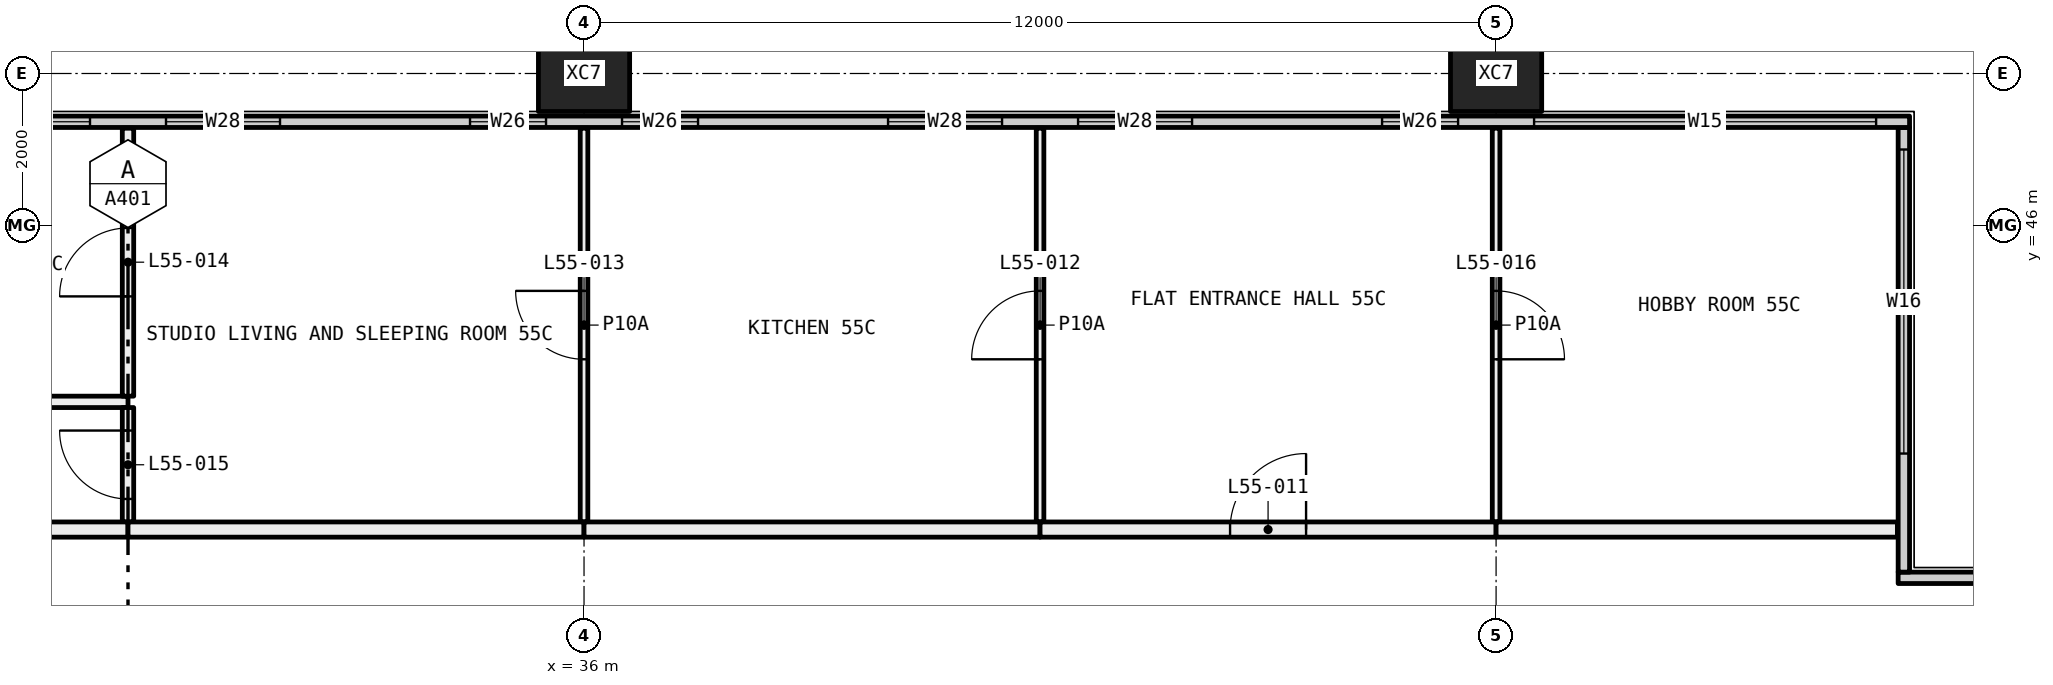
"""IFC4 building model, lengths in metres.
Left out: names, types, materials, properties, quantities, classifications, styles, units other than length and angle.
Written with IfcOpenShell. Run it as: python <this file> out.ifc"""

import sys

from ifc_helpers import new_model, si_unit, direction, frame, frame_2d, origin, origin_2d, place, context, subcontext, project, spatial, rectangle, hollow_rectangle, extrude, element, fill, save


model = new_model("IFC4")
c1 = context("Model", 3, precision=1e-05, world=origin(), true_north=direction((0.0, 1.0)))
c2 = subcontext(c1, "Body", "Model", "MODEL_VIEW")
j1 = project(units=[si_unit("LENGTHUNIT", "METRE"), si_unit("PLANEANGLEUNIT", "RADIAN")], contexts=[c1])
p1 = place(None, origin())
s1 = spatial("IfcSite", under=j1, at=p1, CompositionType="ELEMENT")
p2 = place(p1, origin())
s2 = spatial("IfcBuilding", under=s1, at=p2, CompositionType="ELEMENT")
p3 = place(p2, frame((0.0, 0.0, 206.55)))
s3 = spatial("IfcBuildingStorey", under=s2, at=p3, CompositionType="ELEMENT", Elevation=206.55)
for number, where, z_axis, x_axis in (
    (1, (36.0, 48.0, -0.4), (0.0, 0.0, 1.0), (1.0, 0.0, 0.0)),
    (2, (48.0, 48.0, -0.4), (0.0, 0.0, 1.0), (1.0, 0.0, 0.0)),
):
    element("IfcColumn", number, at=place(p3, frame(where, z_axis=z_axis, x_axis=x_axis)), inside=s3, PredefinedType="COLUMN", context=c2, shape_type="SweptSolid", body=[
        extrude(hollow_rectangle(XDim=1.2, YDim=1.0, WallThickness=0.045, at=origin_2d()), origin(), (0.0, 0.0, 1.0), 3.45),
    ])
p4 = place(p3, frame((53.29, 41.365, 0.0), z_axis=(0.0, 0.0, 1.0), x_axis=(1.0, 0.0, 0.0)))
e3 = element("IfcWall", 3, at=p4, inside=s3, PredefinedType="ELEMENTEDWALL", context=c2, shape_type="SweptSolid", body=[
    extrude(rectangle(XDim=6.15, YDim=0.15, at=frame_2d((3.075, 0.0))), origin(), (0.0, 0.0, 1.0), 3.05),
])
p5 = place(p4, frame((1.71, 0.0, 0.45)))
e4 = element("IfcOpeningElement", 4, at=p5, cuts=e3, PredefinedType="OPENING", context=c2, shape_type="SweptSolid", body=[
    extrude(rectangle(XDim=4.0, YDim=2.55, at=frame_2d((2.0, 1.275))), frame((0.0, 0.085, 0.0), z_axis=(0.0, -1.0, 0.0), x_axis=(1.0, 0.0, 0.0)), (0.0, 0.0, 1.0), 0.17),
])
p6 = place(p3, frame((53.365, 41.44, 0.0), z_axis=(0.0, 0.0, 1.0), x_axis=(0.0, 1.0, 0.0)))
e5 = element("IfcWall", 5, at=p6, inside=s3, PredefinedType="ELEMENTEDWALL", context=c2, shape_type="SweptSolid", body=[
    extrude(rectangle(XDim=5.85, YDim=0.15, at=frame_2d((2.925, 0.0))), origin(), (0.0, 0.0, 1.0), 3.05),
])
p7 = place(p6, frame((1.56, 0.0, 0.45)))
e6 = element("IfcOpeningElement", 6, at=p7, cuts=e5, PredefinedType="OPENING", context=c2, shape_type="SweptSolid", body=[
    extrude(rectangle(XDim=4.0, YDim=2.55, at=frame_2d((2.0, 1.275))), frame((0.0, 0.085, 0.0), z_axis=(0.0, -1.0, 0.0), x_axis=(1.0, 0.0, 0.0)), (0.0, 0.0, 1.0), 0.17),
])
p8 = place(p3, frame((6.56, 47.365, 0.0), z_axis=(0.0, 0.0, 1.0), x_axis=(1.0, 0.0, 0.0)))
e7 = element("IfcWall", 7, at=p8, inside=s3, PredefinedType="ELEMENTEDWALL", context=c2, shape_type="SweptSolid", body=[
    extrude(rectangle(XDim=46.88, YDim=0.15, at=frame_2d((23.44, 0.0))), origin(), (0.0, 0.0, 1.0), 3.05),
])
p9 = place(p8, frame((0.44, 0.0, 0.45)))
e8 = element("IfcOpeningElement", 8, at=p9, cuts=e7, PredefinedType="OPENING", context=c2, shape_type="SweptSolid", body=[
    extrude(rectangle(XDim=4.5, YDim=2.55, at=frame_2d((2.25, 1.275))), frame((0.0, 0.085, 0.0), z_axis=(0.0, -1.0, 0.0), x_axis=(1.0, 0.0, 0.0)), (0.0, 0.0, 1.0), 0.17),
])
p10 = place(p8, frame((5.94, 0.0, 0.45)))
e9 = element("IfcOpeningElement", 9, at=p10, cuts=e7, PredefinedType="OPENING", context=c2, shape_type="SweptSolid", body=[
    extrude(rectangle(XDim=1.0, YDim=2.55, at=frame_2d((0.5, 1.275))), frame((0.0, 0.085, 0.0), z_axis=(0.0, -1.0, 0.0), x_axis=(1.0, 0.0, 0.0)), (0.0, 0.0, 1.0), 0.17),
])
p11 = place(p8, frame((9.44, 0.0, 0.45)))
e10 = element("IfcOpeningElement", 10, at=p11, cuts=e7, PredefinedType="OPENING", context=c2, shape_type="SweptSolid", body=[
    extrude(rectangle(XDim=1.5, YDim=2.55, at=frame_2d((0.75, 1.275))), frame((0.0, 0.085, 0.0), z_axis=(0.0, -1.0, 0.0), x_axis=(1.0, 0.0, 0.0)), (0.0, 0.0, 1.0), 0.17),
])
p12 = place(p8, frame((11.94, 0.0, 0.45)))
e11 = element("IfcOpeningElement", 11, at=p12, cuts=e7, PredefinedType="OPENING", context=c2, shape_type="SweptSolid", body=[
    extrude(rectangle(XDim=1.5, YDim=2.55, at=frame_2d((0.75, 1.275))), frame((0.0, 0.085, 0.0), z_axis=(0.0, -1.0, 0.0), x_axis=(1.0, 0.0, 0.0)), (0.0, 0.0, 1.0), 0.17),
])
p13 = place(p8, frame((15.94, 0.0, 0.45)))
e12 = element("IfcOpeningElement", 12, at=p13, cuts=e7, PredefinedType="OPENING", context=c2, shape_type="SweptSolid", body=[
    extrude(rectangle(XDim=1.0, YDim=2.55, at=frame_2d((0.5, 1.275))), frame((0.0, 0.085, 0.0), z_axis=(0.0, -1.0, 0.0), x_axis=(1.0, 0.0, 0.0)), (0.0, 0.0, 1.0), 0.17),
])
p14 = place(p8, frame((17.94, 0.0, 0.45)))
e13 = element("IfcOpeningElement", 13, at=p14, cuts=e7, PredefinedType="OPENING", context=c2, shape_type="SweptSolid", body=[
    extrude(rectangle(XDim=1.0, YDim=2.55, at=frame_2d((0.5, 1.275))), frame((0.0, 0.085, 0.0), z_axis=(0.0, -1.0, 0.0), x_axis=(1.0, 0.0, 0.0)), (0.0, 0.0, 1.0), 0.17),
])
p15 = place(p8, frame((21.44, 0.0, 0.45)))
e14 = element("IfcOpeningElement", 14, at=p15, cuts=e7, PredefinedType="OPENING", context=c2, shape_type="SweptSolid", body=[
    extrude(rectangle(XDim=1.5, YDim=2.55, at=frame_2d((0.75, 1.275))), frame((0.0, 0.085, 0.0), z_axis=(0.0, -1.0, 0.0), x_axis=(1.0, 0.0, 0.0)), (0.0, 0.0, 1.0), 0.17),
])
p16 = place(p8, frame((23.94, 0.0, 0.45)))
e15 = element("IfcOpeningElement", 15, at=p16, cuts=e7, PredefinedType="OPENING", context=c2, shape_type="SweptSolid", body=[
    extrude(rectangle(XDim=1.5, YDim=2.55, at=frame_2d((0.75, 1.275))), frame((0.0, 0.085, 0.0), z_axis=(0.0, -1.0, 0.0), x_axis=(1.0, 0.0, 0.0)), (0.0, 0.0, 1.0), 0.17),
])
p17 = place(p8, frame((27.94, 0.0, 0.45)))
e16 = element("IfcOpeningElement", 16, at=p17, cuts=e7, PredefinedType="OPENING", context=c2, shape_type="SweptSolid", body=[
    extrude(rectangle(XDim=1.0, YDim=2.55, at=frame_2d((0.5, 1.275))), frame((0.0, 0.085, 0.0), z_axis=(0.0, -1.0, 0.0), x_axis=(1.0, 0.0, 0.0)), (0.0, 0.0, 1.0), 0.17),
])
p18 = place(p8, frame((29.94, 0.0, 0.45)))
e17 = element("IfcOpeningElement", 17, at=p18, cuts=e7, PredefinedType="OPENING", context=c2, shape_type="SweptSolid", body=[
    extrude(rectangle(XDim=1.0, YDim=2.55, at=frame_2d((0.5, 1.275))), frame((0.0, 0.085, 0.0), z_axis=(0.0, -1.0, 0.0), x_axis=(1.0, 0.0, 0.0)), (0.0, 0.0, 1.0), 0.17),
])
p19 = place(p8, frame((33.44, 0.0, 0.45)))
e18 = element("IfcOpeningElement", 18, at=p19, cuts=e7, PredefinedType="OPENING", context=c2, shape_type="SweptSolid", body=[
    extrude(rectangle(XDim=1.5, YDim=2.55, at=frame_2d((0.75, 1.275))), frame((0.0, 0.085, 0.0), z_axis=(0.0, -1.0, 0.0), x_axis=(1.0, 0.0, 0.0)), (0.0, 0.0, 1.0), 0.17),
])
p20 = place(p8, frame((35.94, 0.0, 0.45)))
e19 = element("IfcOpeningElement", 19, at=p20, cuts=e7, PredefinedType="OPENING", context=c2, shape_type="SweptSolid", body=[
    extrude(rectangle(XDim=1.5, YDim=2.55, at=frame_2d((0.75, 1.275))), frame((0.0, 0.085, 0.0), z_axis=(0.0, -1.0, 0.0), x_axis=(1.0, 0.0, 0.0)), (0.0, 0.0, 1.0), 0.17),
])
p21 = place(p8, frame((39.94, 0.0, 0.45)))
e20 = element("IfcOpeningElement", 20, at=p21, cuts=e7, PredefinedType="OPENING", context=c2, shape_type="SweptSolid", body=[
    extrude(rectangle(XDim=1.0, YDim=2.55, at=frame_2d((0.5, 1.275))), frame((0.0, 0.085, 0.0), z_axis=(0.0, -1.0, 0.0), x_axis=(1.0, 0.0, 0.0)), (0.0, 0.0, 1.0), 0.17),
])
p22 = place(p8, frame((41.94, 0.0, 0.45)))
e21 = element("IfcOpeningElement", 21, at=p22, cuts=e7, PredefinedType="OPENING", context=c2, shape_type="SweptSolid", body=[
    extrude(rectangle(XDim=4.5, YDim=2.55, at=frame_2d((2.25, 1.275))), frame((0.0, 0.085, 0.0), z_axis=(0.0, -1.0, 0.0), x_axis=(1.0, 0.0, 0.0)), (0.0, 0.0, 1.0), 0.17),
])
p23 = place(p3, frame((24.1, 43.68, 0.0), z_axis=(0.0, 0.0, 1.0), x_axis=(1.0, 0.0, 0.0)))
e22 = element("IfcWall", 22, at=p23, inside=s3, PredefinedType="PARTITIONING", context=c2, shape_type="SweptSolid", body=[
    extrude(rectangle(XDim=5.9, YDim=0.15, at=frame_2d((2.95, 0.0))), origin(), (0.0, 0.0, 1.0), 3.05),
])
p24 = place(p3, frame((30.0, 43.755, 0.0), z_axis=(0.0, 0.0, 1.0), x_axis=(0.0, 1.0, 0.0)))
e23 = element("IfcWall", 23, at=p24, inside=s3, PredefinedType="PARTITIONING", context=c2, shape_type="SweptSolid", body=[
    extrude(rectangle(XDim=3.525, YDim=0.15, at=frame_2d((1.763, 0.0))), origin(), (0.0, 0.0, 1.0), 3.05),
])
p25 = place(p24, frame((1.312, 0.0, 0.0)))
e24 = element("IfcOpeningElement", 24, at=p25, cuts=e23, PredefinedType="OPENING", context=c2, shape_type="SweptSolid", body=[
    extrude(rectangle(XDim=0.9, YDim=2.1, at=frame_2d((0.45, 1.05))), frame((0.0, 0.085, 0.0), z_axis=(0.0, -1.0, 0.0), x_axis=(1.0, 0.0, 0.0)), (0.0, 0.0, 1.0), 0.17),
])
p26 = place(p3, frame((30.0, 42.1, 0.0), z_axis=(0.0, 0.0, 1.0), x_axis=(0.0, 1.0, 0.0)))
e25 = element("IfcWall", 25, at=p26, inside=s3, PredefinedType="PARTITIONING", context=c2, shape_type="SweptSolid", body=[
    extrude(rectangle(XDim=1.505, YDim=0.15, at=frame_2d((0.752, 0.0))), origin(), (0.0, 0.0, 1.0), 3.05),
])
p27 = place(p26, frame((0.302, 0.0, 0.0)))
e26 = element("IfcOpeningElement", 26, at=p27, cuts=e25, PredefinedType="OPENING", context=c2, shape_type="SweptSolid", body=[
    extrude(rectangle(XDim=0.9, YDim=2.1, at=frame_2d((0.45, 1.05))), frame((0.0, 0.085, 0.0), z_axis=(0.0, -1.0, 0.0), x_axis=(1.0, 0.0, 0.0)), (0.0, 0.0, 1.0), 0.17),
])
p28 = place(p3, frame((24.1, 42.0, 0.0), z_axis=(0.0, 0.0, 1.0), x_axis=(1.0, 0.0, 0.0)))
e27 = element("IfcWall", 27, at=p28, inside=s3, PredefinedType="PARTITIONING", context=c2, shape_type="SweptSolid", body=[
    extrude(rectangle(XDim=5.9, YDim=0.2, at=frame_2d((2.95, 0.0))), origin(), (0.0, 0.0, 1.0), 3.05),
])
p29 = place(p3, frame((36.0, 42.1, 0.0), z_axis=(0.0, 0.0, 1.0), x_axis=(0.0, 1.0, 0.0)))
e28 = element("IfcWall", 28, at=p29, inside=s3, PredefinedType="PARTITIONING", context=c2, shape_type="SweptSolid", body=[
    extrude(rectangle(XDim=5.18, YDim=0.1, at=frame_2d((2.59, 0.0))), origin(), (0.0, 0.0, 1.0), 2.45),
])
p30 = place(p29, frame((2.14, 0.0, 0.0)))
e29 = element("IfcOpeningElement", 29, at=p30, cuts=e28, PredefinedType="OPENING", context=c2, shape_type="SweptSolid", body=[
    extrude(rectangle(XDim=0.9, YDim=2.1, at=frame_2d((0.45, 1.05))), frame((0.0, 0.06, 0.0), z_axis=(0.0, -1.0, 0.0), x_axis=(1.0, 0.0, 0.0)), (0.0, 0.0, 1.0), 0.12),
])
p31 = place(p3, frame((30.0, 42.0, 0.0), z_axis=(0.0, 0.0, 1.0), x_axis=(1.0, 0.0, 0.0)))
e30 = element("IfcWall", 30, at=p31, inside=s3, PredefinedType="PARTITIONING", context=c2, shape_type="SweptSolid", body=[
    extrude(rectangle(XDim=6.0, YDim=0.2, at=frame_2d((3.0, 0.0))), origin(), (0.0, 0.0, 1.0), 2.45),
])
p32 = place(p3, frame((42.0, 42.1, 0.0), z_axis=(0.0, 0.0, 1.0), x_axis=(0.0, 1.0, 0.0)))
e31 = element("IfcWall", 31, at=p32, inside=s3, PredefinedType="PARTITIONING", context=c2, shape_type="SweptSolid", body=[
    extrude(rectangle(XDim=5.18, YDim=0.1, at=frame_2d((2.59, 0.0))), origin(), (0.0, 0.0, 1.0), 3.05),
])
p33 = place(p32, frame((2.14, 0.0, 0.0)))
e32 = element("IfcOpeningElement", 32, at=p33, cuts=e31, PredefinedType="OPENING", context=c2, shape_type="SweptSolid", body=[
    extrude(rectangle(XDim=0.9, YDim=2.1, at=frame_2d((0.45, 1.05))), frame((0.0, 0.06, 0.0), z_axis=(0.0, -1.0, 0.0), x_axis=(1.0, 0.0, 0.0)), (0.0, 0.0, 1.0), 0.12),
])
p34 = place(p3, frame((36.0, 42.0, 0.0), z_axis=(0.0, 0.0, 1.0), x_axis=(1.0, 0.0, 0.0)))
e33 = element("IfcWall", 33, at=p34, inside=s3, PredefinedType="PARTITIONING", context=c2, shape_type="SweptSolid", body=[
    extrude(rectangle(XDim=6.0, YDim=0.2, at=frame_2d((3.0, 0.0))), origin(), (0.0, 0.0, 1.0), 2.45),
])
p35 = place(p3, frame((48.0, 42.1, 0.0), z_axis=(0.0, 0.0, 1.0), x_axis=(0.0, 1.0, 0.0)))
e34 = element("IfcWall", 34, at=p35, inside=s3, PredefinedType="PARTITIONING", context=c2, shape_type="SweptSolid", body=[
    extrude(rectangle(XDim=5.18, YDim=0.1, at=frame_2d((2.59, 0.0))), origin(), (0.0, 0.0, 1.0), 3.05),
])
p36 = place(p35, frame((2.14, 0.0, 0.0)))
e35 = element("IfcOpeningElement", 35, at=p36, cuts=e34, PredefinedType="OPENING", context=c2, shape_type="SweptSolid", body=[
    extrude(rectangle(XDim=0.9, YDim=2.1, at=frame_2d((0.45, 1.05))), frame((0.0, 0.06, 0.0), z_axis=(0.0, -1.0, 0.0), x_axis=(1.0, 0.0, 0.0)), (0.0, 0.0, 1.0), 0.12),
])
p37 = place(p3, frame((42.0, 42.0, 0.0), z_axis=(0.0, 0.0, 1.0), x_axis=(1.0, 0.0, 0.0)))
e36 = element("IfcWall", 36, at=p37, inside=s3, PredefinedType="PARTITIONING", context=c2, shape_type="SweptSolid", body=[
    extrude(rectangle(XDim=6.0, YDim=0.2, at=frame_2d((3.0, 0.0))), origin(), (0.0, 0.0, 1.0), 3.05),
])
p38 = place(p37, frame((2.5, 0.0, 0.0)))
e37 = element("IfcOpeningElement", 37, at=p38, cuts=e36, PredefinedType="OPENING", context=c2, shape_type="SweptSolid", body=[
    extrude(rectangle(XDim=1.0, YDim=2.1, at=frame_2d((0.5, 1.05))), frame((0.0, 0.11, 0.0), z_axis=(0.0, -1.0, 0.0), x_axis=(1.0, 0.0, 0.0)), (0.0, 0.0, 1.0), 0.22),
])
p39 = place(p3, frame((48.0, 42.0, 0.0), z_axis=(0.0, 0.0, 1.0), x_axis=(1.0, 0.0, 0.0)))
e38 = element("IfcWall", 38, at=p39, inside=s3, PredefinedType="PARTITIONING", context=c2, shape_type="SweptSolid", body=[
    extrude(rectangle(XDim=5.28, YDim=0.2, at=frame_2d((2.64, 0.0))), origin(), (0.0, 0.0, 1.0), 3.05),
])
p40 = place(p7, origin())
e39 = element("IfcWindow", 39, at=p40, inside=s3, PartitioningType="SINGLE_PANEL", PredefinedType="WINDOW", context=c2, shape_type="SweptSolid", body=[
    extrude(rectangle(XDim=4.0, YDim=2.55, at=frame_2d((2.0, 1.275))), frame((0.0, 0.03, 0.0), z_axis=(0.0, -1.0, 0.0), x_axis=(1.0, 0.0, 0.0)), (0.0, 0.0, 1.0), 0.06),
])
fill(e6, e39)
p41 = place(p15, origin())
e40 = element("IfcWindow", 40, at=p41, inside=s3, PartitioningType="SINGLE_PANEL", PredefinedType="WINDOW", context=c2, shape_type="SweptSolid", body=[
    extrude(rectangle(XDim=1.5, YDim=2.55, at=frame_2d((0.75, 1.275))), frame((0.0, 0.03, 0.0), z_axis=(0.0, -1.0, 0.0), x_axis=(1.0, 0.0, 0.0)), (0.0, 0.0, 1.0), 0.06),
])
fill(e14, e40)
p42 = place(p16, origin())
e41 = element("IfcWindow", 41, at=p42, inside=s3, PartitioningType="SINGLE_PANEL", PredefinedType="WINDOW", context=c2, shape_type="SweptSolid", body=[
    extrude(rectangle(XDim=1.5, YDim=2.55, at=frame_2d((0.75, 1.275))), frame((0.0, 0.03, 0.0), z_axis=(0.0, -1.0, 0.0), x_axis=(1.0, 0.0, 0.0)), (0.0, 0.0, 1.0), 0.06),
])
fill(e15, e41)
p43 = place(p17, origin())
e42 = element("IfcWindow", 42, at=p43, inside=s3, PartitioningType="SINGLE_PANEL", PredefinedType="WINDOW", context=c2, shape_type="SweptSolid", body=[
    extrude(rectangle(XDim=1.0, YDim=2.55, at=frame_2d((0.5, 1.275))), frame((0.0, 0.03, 0.0), z_axis=(0.0, -1.0, 0.0), x_axis=(1.0, 0.0, 0.0)), (0.0, 0.0, 1.0), 0.06),
])
fill(e16, e42)
p44 = place(p18, origin())
e43 = element("IfcWindow", 43, at=p44, inside=s3, PartitioningType="SINGLE_PANEL", PredefinedType="WINDOW", context=c2, shape_type="SweptSolid", body=[
    extrude(rectangle(XDim=1.0, YDim=2.55, at=frame_2d((0.5, 1.275))), frame((0.0, 0.03, 0.0), z_axis=(0.0, -1.0, 0.0), x_axis=(1.0, 0.0, 0.0)), (0.0, 0.0, 1.0), 0.06),
])
fill(e17, e43)
p45 = place(p19, origin())
e44 = element("IfcWindow", 44, at=p45, inside=s3, PartitioningType="SINGLE_PANEL", PredefinedType="WINDOW", context=c2, shape_type="SweptSolid", body=[
    extrude(rectangle(XDim=1.5, YDim=2.55, at=frame_2d((0.75, 1.275))), frame((0.0, 0.03, 0.0), z_axis=(0.0, -1.0, 0.0), x_axis=(1.0, 0.0, 0.0)), (0.0, 0.0, 1.0), 0.06),
])
fill(e18, e44)
p46 = place(p20, origin())
e45 = element("IfcWindow", 45, at=p46, inside=s3, PartitioningType="SINGLE_PANEL", PredefinedType="WINDOW", context=c2, shape_type="SweptSolid", body=[
    extrude(rectangle(XDim=1.5, YDim=2.55, at=frame_2d((0.75, 1.275))), frame((0.0, 0.03, 0.0), z_axis=(0.0, -1.0, 0.0), x_axis=(1.0, 0.0, 0.0)), (0.0, 0.0, 1.0), 0.06),
])
fill(e19, e45)
p47 = place(p21, origin())
e46 = element("IfcWindow", 46, at=p47, inside=s3, PartitioningType="SINGLE_PANEL", PredefinedType="WINDOW", context=c2, shape_type="SweptSolid", body=[
    extrude(rectangle(XDim=1.0, YDim=2.55, at=frame_2d((0.5, 1.275))), frame((0.0, 0.03, 0.0), z_axis=(0.0, -1.0, 0.0), x_axis=(1.0, 0.0, 0.0)), (0.0, 0.0, 1.0), 0.06),
])
fill(e20, e46)
p48 = place(p22, origin())
e47 = element("IfcWindow", 47, at=p48, inside=s3, PartitioningType="SINGLE_PANEL", PredefinedType="WINDOW", context=c2, shape_type="SweptSolid", body=[
    extrude(rectangle(XDim=4.5, YDim=2.55, at=frame_2d((2.25, 1.275))), frame((0.0, 0.03, 0.0), z_axis=(0.0, -1.0, 0.0), x_axis=(1.0, 0.0, 0.0)), (0.0, 0.0, 1.0), 0.06),
])
fill(e21, e47)
p49 = place(p38, origin())
e48 = element("IfcDoor", 48, at=p49, inside=s3, OperationType="SINGLE_SWING_LEFT", PredefinedType="DOOR", context=c2, shape_type="SweptSolid", body=[
    extrude(rectangle(XDim=1.0, YDim=2.1, at=frame_2d((0.5, 1.05))), frame((0.0, 0.025, 0.0), z_axis=(0.0, -1.0, 0.0), x_axis=(1.0, 0.0, 0.0)), (0.0, 0.0, 1.0), 0.05),
])
fill(e37, e48)
p50 = place(p33, origin())
e49 = element("IfcDoor", 49, at=p50, inside=s3, OperationType="SINGLE_SWING_RIGHT", PredefinedType="DOOR", context=c2, shape_type="SweptSolid", body=[
    extrude(rectangle(XDim=0.9, YDim=2.1, at=frame_2d((0.45, 1.05))), frame((0.0, 0.025, 0.0), z_axis=(0.0, -1.0, 0.0), x_axis=(1.0, 0.0, 0.0)), (0.0, 0.0, 1.0), 0.05),
])
fill(e32, e49)
p51 = place(p30, origin())
e50 = element("IfcDoor", 50, at=p51, inside=s3, OperationType="SINGLE_SWING_LEFT", PredefinedType="DOOR", context=c2, shape_type="SweptSolid", body=[
    extrude(rectangle(XDim=0.9, YDim=2.1, at=frame_2d((0.45, 1.05))), frame((0.0, 0.025, 0.0), z_axis=(0.0, -1.0, 0.0), x_axis=(1.0, 0.0, 0.0)), (0.0, 0.0, 1.0), 0.05),
])
fill(e29, e50)
p52 = place(p25, origin())
e51 = element("IfcDoor", 51, at=p52, inside=s3, OperationType="SINGLE_SWING_RIGHT", PredefinedType="DOOR", context=c2, shape_type="SweptSolid", body=[
    extrude(rectangle(XDim=0.9, YDim=2.1, at=frame_2d((0.45, 1.05))), frame((0.0, 0.025, 0.0), z_axis=(0.0, -1.0, 0.0), x_axis=(1.0, 0.0, 0.0)), (0.0, 0.0, 1.0), 0.05),
])
fill(e24, e51)
p53 = place(p27, origin())
e52 = element("IfcDoor", 52, at=p53, inside=s3, OperationType="SINGLE_SWING_LEFT", PredefinedType="DOOR", context=c2, shape_type="SweptSolid", body=[
    extrude(rectangle(XDim=0.9, YDim=2.1, at=frame_2d((0.45, 1.05))), frame((0.0, 0.025, 0.0), z_axis=(0.0, -1.0, 0.0), x_axis=(1.0, 0.0, 0.0)), (0.0, 0.0, 1.0), 0.05),
])
fill(e26, e52)
p54 = place(p36, frame((0.9, 0.0, 0.0), x_axis=(-1.0, 0.0, 0.0)))
e53 = element("IfcDoor", 53, at=p54, inside=s3, OperationType="SINGLE_SWING_LEFT", PredefinedType="DOOR", context=c2, shape_type="SweptSolid", body=[
    extrude(rectangle(XDim=0.9, YDim=2.1, at=frame_2d((0.45, 1.05))), frame((0.0, 0.025, 0.0), z_axis=(0.0, -1.0, 0.0), x_axis=(1.0, 0.0, 0.0)), (0.0, 0.0, 1.0), 0.05),
])
fill(e35, e53)
save(model, sys.argv[1])
